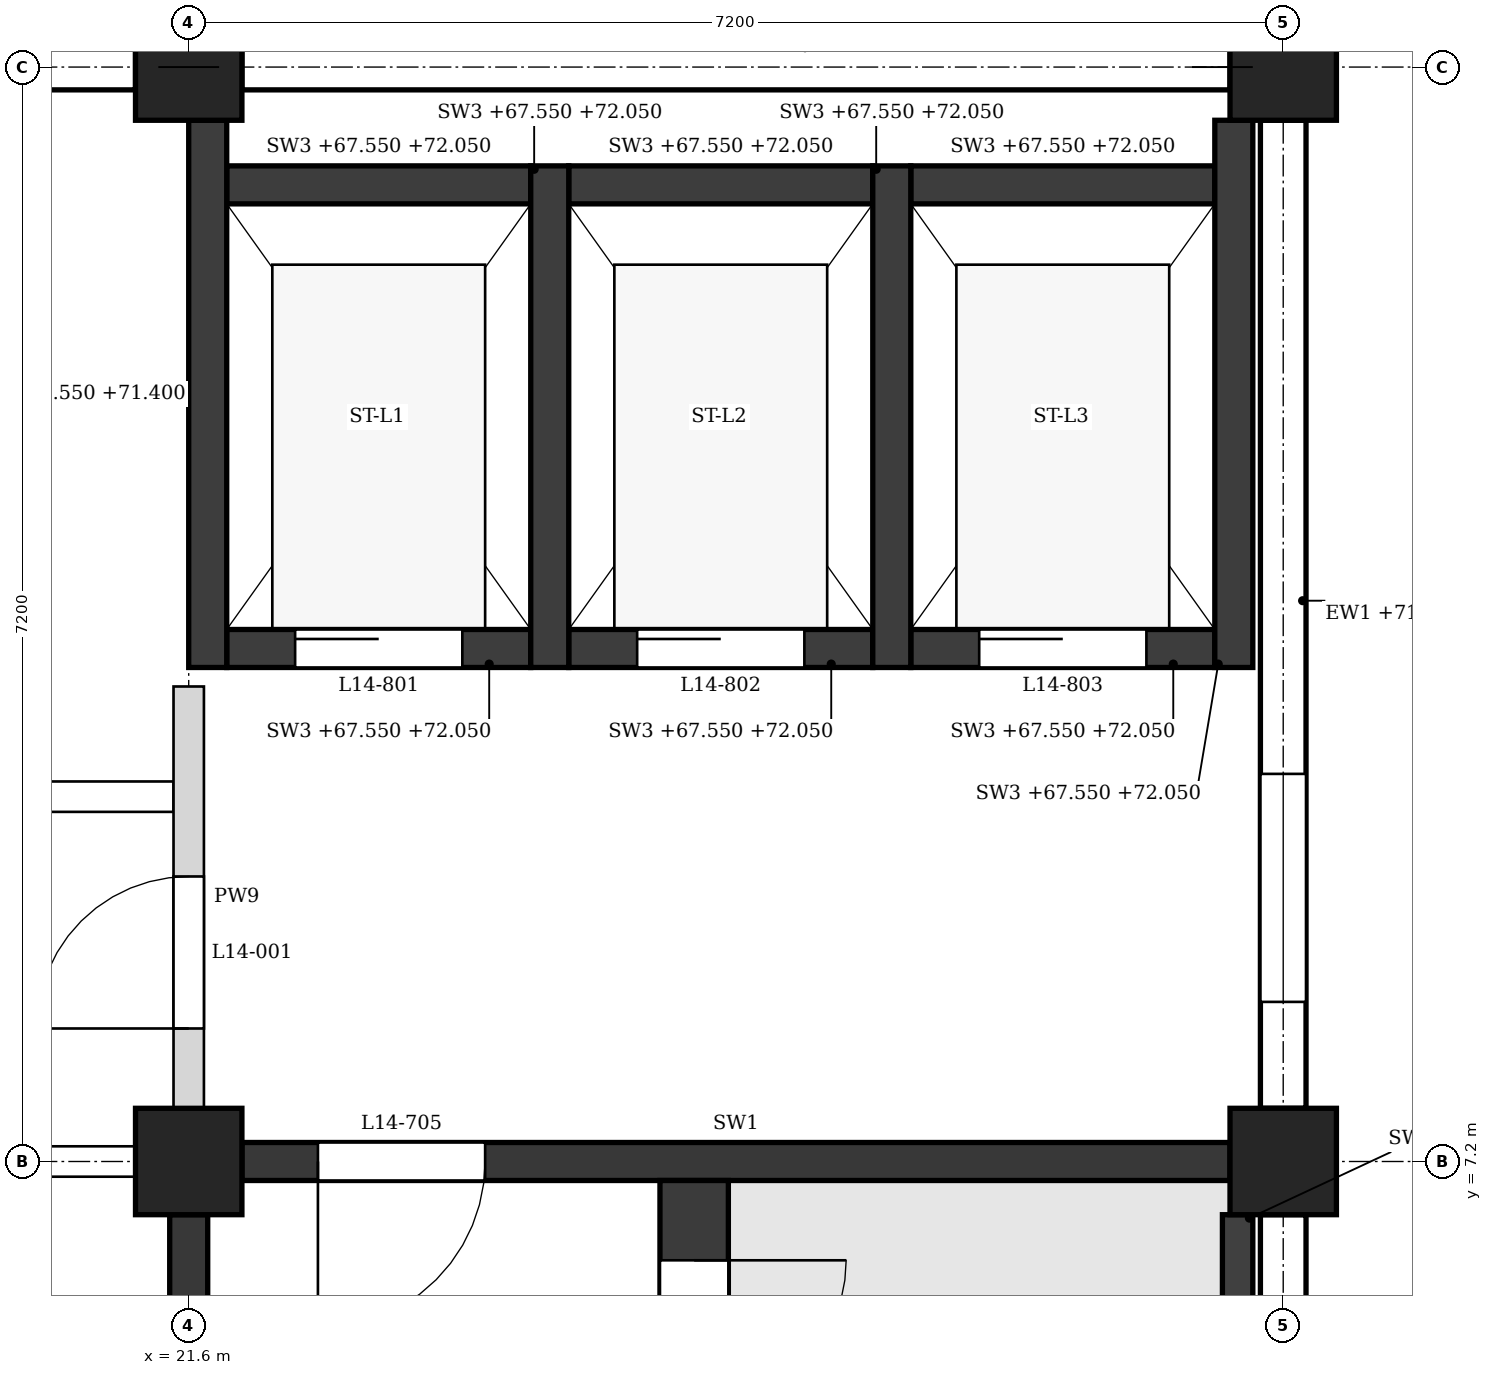
"""IFC4 building model, lengths in metres.
Left out: names, types, materials, properties, quantities, classifications, styles, units other than length and angle.
Written with IfcOpenShell. Run it as: python <this file> out.ifc"""

import sys

from ifc_helpers import new_model, si_unit, direction, frame, frame_2d, origin, origin_2d, place, context, subcontext, project, spatial, polyline, rectangle, outline, extrude, element, fill, save


model = new_model("IFC4")
c1 = context("Model", 3, precision=1e-05, world=origin(), true_north=direction((0.0, 1.0)))
c2 = subcontext(c1, "Body", "Model", "MODEL_VIEW")
j1 = project(units=[si_unit("LENGTHUNIT", "METRE"), si_unit("PLANEANGLEUNIT", "RADIAN")], contexts=[c1])
p1 = place(None, origin())
s1 = spatial("IfcSite", under=j1, at=p1, CompositionType="ELEMENT")
p2 = place(p1, origin())
s2 = spatial("IfcBuilding", under=s1, at=p2, CompositionType="ELEMENT")
p3 = place(p2, frame((0.0, 0.0, 67.8)))
s3 = spatial("IfcBuildingStorey", under=s2, at=p3, CompositionType="ELEMENT", Elevation=67.8)
for number, where, z_axis, x_axis in (
    (1, (21.6, 7.2, 0.0), (0.0, 0.0, 1.0), (1.0, 0.0, 0.0)),
    (2, (21.6, 14.4, 0.0), (0.0, 0.0, 1.0), (1.0, 0.0, 0.0)),
    (3, (28.8, 7.2, 0.0), (0.0, 0.0, 1.0), (1.0, 0.0, 0.0)),
    (4, (28.8, 14.4, 0.0), (0.0, 0.0, 1.0), (1.0, 0.0, 0.0)),
):
    element("IfcColumn", number, at=place(p3, frame(where, z_axis=z_axis, x_axis=x_axis)), inside=s3, PredefinedType="COLUMN", context=c2, shape_type="SweptSolid", body=[
        extrude(rectangle(XDim=0.7, YDim=0.7, at=origin_2d()), origin(), (0.0, 0.0, 1.0), 4.5),
    ])
p4 = place(p3, frame((28.8, 0.35, 0.0), z_axis=(0.0, 0.0, 1.0), x_axis=(0.0, 1.0, 0.0)))
e5 = element("IfcWall", 5, at=p4, inside=s3, PredefinedType="STANDARD", context=c2, shape_type="SweptSolid", body=[
    extrude(rectangle(XDim=6.5, YDim=0.3, at=frame_2d((3.25, 0.0))), origin(), (0.0, 0.0, 1.0), 3.65),
])
p5 = place(p4, frame((1.0, 0.0, 0.9)))
e6 = element("IfcOpeningElement", 6, at=p5, cuts=e5, PredefinedType="OPENING", context=c2, shape_type="SweptSolid", body=[
    extrude(outline(polyline([(0.0, 0.0), (0.9, 0.0), (0.9, 2.25), (0.45, 2.7), (0.0, 2.25), (0.0, 0.0)])), frame((0.0, 0.16, 0.0), z_axis=(0.0, -1.0, 0.0), x_axis=(1.0, 0.0, 0.0)), (0.0, 0.0, 1.0), 0.32),
])
p6 = place(p4, frame((4.6, 0.0, 0.9)))
e7 = element("IfcOpeningElement", 7, at=p6, cuts=e5, PredefinedType="OPENING", context=c2, shape_type="SweptSolid", body=[
    extrude(outline(polyline([(0.0, 0.0), (0.9, 0.0), (0.9, 2.25), (0.45, 2.7), (0.0, 2.25), (0.0, 0.0)])), frame((0.0, 0.16, 0.0), z_axis=(0.0, -1.0, 0.0), x_axis=(1.0, 0.0, 0.0)), (0.0, 0.0, 1.0), 0.32),
])
p7 = place(p3, frame((28.8, 7.55, 0.0), z_axis=(0.0, 0.0, 1.0), x_axis=(0.0, 1.0, 0.0)))
e8 = element("IfcWall", 8, at=p7, inside=s3, PredefinedType="STANDARD", context=c2, shape_type="SweptSolid", body=[
    extrude(rectangle(XDim=6.5, YDim=0.3, at=frame_2d((3.25, 0.0))), origin(), (0.0, 0.0, 1.0), 3.65),
])
p8 = place(p7, frame((0.7, 0.0, 0.9)))
e9 = element("IfcOpeningElement", 9, at=p8, cuts=e8, PredefinedType="OPENING", context=c2, shape_type="SweptSolid", body=[
    extrude(outline(polyline([(0.0, 0.0), (1.5, 0.0), (1.5, 1.95), (0.75, 2.7), (0.0, 1.95), (0.0, 0.0)])), frame((0.0, 0.16, 0.0), z_axis=(0.0, -1.0, 0.0), x_axis=(1.0, 0.0, 0.0)), (0.0, 0.0, 1.0), 0.32),
])
p9 = place(p3, frame((28.45, 14.4, 0.0), z_axis=(0.0, 0.0, 1.0), x_axis=(-1.0, 0.0, 0.0)))
e10 = element("IfcWall", 10, at=p9, inside=s3, PredefinedType="STANDARD", context=c2, shape_type="SweptSolid", body=[
    extrude(rectangle(XDim=6.5, YDim=0.3, at=frame_2d((3.25, 0.0))), origin(), (0.0, 0.0, 1.0), 3.65),
])
p10 = place(p3, frame((21.25, 14.4, 0.0), z_axis=(0.0, 0.0, 1.0), x_axis=(-1.0, 0.0, 0.0)))
e11 = element("IfcWall", 11, at=p10, inside=s3, PredefinedType="STANDARD", context=c2, shape_type="SweptSolid", body=[
    extrude(rectangle(XDim=6.5, YDim=0.3, at=frame_2d((3.25, 0.0))), origin(), (0.0, 0.0, 1.0), 3.65),
])
p11 = place(p10, frame((4.15, 0.0, 0.0)))
e12 = element("IfcOpeningElement", 12, at=p11, cuts=e11, PredefinedType="OPENING", context=c2, shape_type="SweptSolid", body=[
    extrude(rectangle(XDim=1.8, YDim=2.4, at=frame_2d((0.9, 1.2))), frame((0.0, 0.16, 0.0), z_axis=(0.0, -1.0, 0.0), x_axis=(1.0, 0.0, 0.0)), (0.0, 0.0, 1.0), 0.32),
])
p12 = place(p10, frame((0.7, 0.0, 0.9)))
e13 = element("IfcOpeningElement", 13, at=p12, cuts=e11, PredefinedType="OPENING", context=c2, shape_type="SweptSolid", body=[
    extrude(outline(polyline([(0.0, 0.0), (1.5, 0.0), (1.5, 1.95), (0.75, 2.7), (0.0, 1.95), (0.0, 0.0)])), frame((0.0, 0.16, 0.0), z_axis=(0.0, -1.0, 0.0), x_axis=(1.0, 0.0, 0.0)), (0.0, 0.0, 1.0), 0.32),
])
p13 = place(p3, frame((21.95, 7.2, 0.0), z_axis=(0.0, 0.0, 1.0), x_axis=(1.0, 0.0, 0.0)))
e14 = element("IfcWall", 14, at=p13, inside=s3, PredefinedType="SHEAR", context=c2, shape_type="SweptSolid", body=[
    extrude(rectangle(XDim=6.5, YDim=0.25, at=frame_2d((3.25, 0.0))), origin(), (0.0, 0.0, 1.0), 3.6),
])
p14 = place(p13, frame((0.5, 0.0, 0.0)))
e15 = element("IfcOpeningElement", 15, at=p14, cuts=e14, PredefinedType="OPENING", context=c2, shape_type="SweptSolid", body=[
    extrude(rectangle(XDim=1.1, YDim=2.1, at=frame_2d((0.55, 1.05))), frame((0.0, 0.135, 0.0), z_axis=(0.0, -1.0, 0.0), x_axis=(1.0, 0.0, 0.0)), (0.0, 0.0, 1.0), 0.27),
])
p15 = place(p3, frame((21.6, 0.35, 0.0), z_axis=(0.0, 0.0, 1.0), x_axis=(0.0, 1.0, 0.0)))
e16 = element("IfcWall", 16, at=p15, inside=s3, PredefinedType="SHEAR", context=c2, shape_type="SweptSolid", body=[
    extrude(rectangle(XDim=6.5, YDim=0.25, at=frame_2d((3.25, 0.0))), origin(), (0.0, 0.0, 1.0), 3.6),
])
p16 = place(p3, frame((28.5, 5.85, -0.25), z_axis=(0.0, 0.0, 1.0), x_axis=(0.0, 1.0, 0.0)))
e17 = element("IfcWall", 17, at=p16, inside=s3, PredefinedType="SHEAR", context=c2, shape_type="SweptSolid", body=[
    extrude(rectangle(XDim=1.0, YDim=0.2, at=frame_2d((0.5, 0.0))), origin(), (0.0, 0.0, 1.0), 4.5),
])
p17 = place(p3, frame((24.925, 0.15, 0.0), z_axis=(0.0, 0.0, 1.0), x_axis=(0.0, 1.0, 0.0)))
e18 = element("IfcWall", 18, at=p17, inside=s3, PredefinedType="SHEAR", context=c2, shape_type="SweptSolid", body=[
    extrude(rectangle(XDim=6.925, YDim=0.45, at=frame_2d((3.462, 0.0))), origin(), (0.0, 0.0, 1.0), 4.25),
])
p18 = place(p17, frame((5.4, 0.0, 0.0)))
e19 = element("IfcOpeningElement", 19, at=p18, cuts=e18, PredefinedType="OPENING", context=c2, shape_type="SweptSolid", body=[
    extrude(rectangle(XDim=1.0, YDim=2.1, at=frame_2d((0.5, 1.05))), frame((0.0, 0.235, 0.0), z_axis=(0.0, -1.0, 0.0), x_axis=(1.0, 0.0, 0.0)), (0.0, 0.0, 1.0), 0.47),
])
p19 = place(p3, frame((21.725, 10.45, -0.25), z_axis=(0.0, 0.0, 1.0), x_axis=(0.0, 1.0, 0.0)))
e20 = element("IfcWall", 20, at=p19, inside=s3, PredefinedType="SHEAR", context=c2, shape_type="SweptSolid", body=[
    extrude(rectangle(XDim=3.6, YDim=0.25, at=frame_2d((1.8, 0.0))), origin(), (0.0, 0.0, 1.0), 3.85),
])
for number, where, z_axis, x_axis in (
    (21, (23.975, 10.45, -0.25), (0.0, 0.0, 1.0), (0.0, 1.0, 0.0)),
    (22, (26.225, 10.45, -0.25), (0.0, 0.0, 1.0), (0.0, 1.0, 0.0)),
):
    element("IfcWall", number, at=place(p3, frame(where, z_axis=z_axis, x_axis=x_axis)), inside=s3, PredefinedType="SHEAR", context=c2, shape_type="SweptSolid", body=[
        extrude(rectangle(XDim=3.3, YDim=0.25, at=frame_2d((1.65, 0.0))), origin(), (0.0, 0.0, 1.0), 4.5),
    ])
p20 = place(p3, frame((28.475, 10.45, -0.25), z_axis=(0.0, 0.0, 1.0), x_axis=(0.0, 1.0, 0.0)))
e23 = element("IfcWall", 23, at=p20, inside=s3, PredefinedType="SHEAR", context=c2, shape_type="SweptSolid", body=[
    extrude(rectangle(XDim=3.6, YDim=0.25, at=frame_2d((1.8, 0.0))), origin(), (0.0, 0.0, 1.0), 4.5),
])
p21 = place(p3, frame((21.85, 10.575, -0.25), z_axis=(0.0, 0.0, 1.0), x_axis=(1.0, 0.0, 0.0)))
e24 = element("IfcWall", 24, at=p21, inside=s3, PredefinedType="SHEAR", context=c2, shape_type="SweptSolid", body=[
    extrude(rectangle(XDim=2.0, YDim=0.25, at=frame_2d((1.0, 0.0))), origin(), (0.0, 0.0, 1.0), 4.5),
])
p22 = place(p21, frame((0.45, 0.0, 0.25)))
e25 = element("IfcOpeningElement", 25, at=p22, cuts=e24, PredefinedType="OPENING", context=c2, shape_type="SweptSolid", body=[
    extrude(rectangle(XDim=1.1, YDim=2.1, at=frame_2d((0.55, 1.05))), frame((0.0, 0.135, 0.0), z_axis=(0.0, -1.0, 0.0), x_axis=(1.0, 0.0, 0.0)), (0.0, 0.0, 1.0), 0.27),
])
p23 = place(p3, frame((21.85, 13.625, -0.25), z_axis=(0.0, 0.0, 1.0), x_axis=(1.0, 0.0, 0.0)))
e26 = element("IfcWall", 26, at=p23, inside=s3, PredefinedType="SHEAR", context=c2, shape_type="SweptSolid", body=[
    extrude(rectangle(XDim=2.0, YDim=0.25, at=frame_2d((1.0, 0.0))), origin(), (0.0, 0.0, 1.0), 4.5),
])
p24 = place(p3, frame((24.1, 10.575, -0.25), z_axis=(0.0, 0.0, 1.0), x_axis=(1.0, 0.0, 0.0)))
e27 = element("IfcWall", 27, at=p24, inside=s3, PredefinedType="SHEAR", context=c2, shape_type="SweptSolid", body=[
    extrude(rectangle(XDim=2.0, YDim=0.25, at=frame_2d((1.0, 0.0))), origin(), (0.0, 0.0, 1.0), 4.5),
])
p25 = place(p24, frame((0.45, 0.0, 0.25)))
e28 = element("IfcOpeningElement", 28, at=p25, cuts=e27, PredefinedType="OPENING", context=c2, shape_type="SweptSolid", body=[
    extrude(rectangle(XDim=1.1, YDim=2.1, at=frame_2d((0.55, 1.05))), frame((0.0, 0.135, 0.0), z_axis=(0.0, -1.0, 0.0), x_axis=(1.0, 0.0, 0.0)), (0.0, 0.0, 1.0), 0.27),
])
p26 = place(p3, frame((24.1, 13.625, -0.25), z_axis=(0.0, 0.0, 1.0), x_axis=(1.0, 0.0, 0.0)))
e29 = element("IfcWall", 29, at=p26, inside=s3, PredefinedType="SHEAR", context=c2, shape_type="SweptSolid", body=[
    extrude(rectangle(XDim=2.0, YDim=0.25, at=frame_2d((1.0, 0.0))), origin(), (0.0, 0.0, 1.0), 4.5),
])
p27 = place(p3, frame((26.35, 10.575, -0.25), z_axis=(0.0, 0.0, 1.0), x_axis=(1.0, 0.0, 0.0)))
e30 = element("IfcWall", 30, at=p27, inside=s3, PredefinedType="SHEAR", context=c2, shape_type="SweptSolid", body=[
    extrude(rectangle(XDim=2.0, YDim=0.25, at=frame_2d((1.0, 0.0))), origin(), (0.0, 0.0, 1.0), 4.5),
])
p28 = place(p27, frame((0.45, 0.0, 0.25)))
e31 = element("IfcOpeningElement", 31, at=p28, cuts=e30, PredefinedType="OPENING", context=c2, shape_type="SweptSolid", body=[
    extrude(rectangle(XDim=1.1, YDim=2.1, at=frame_2d((0.55, 1.05))), frame((0.0, 0.135, 0.0), z_axis=(0.0, -1.0, 0.0), x_axis=(1.0, 0.0, 0.0)), (0.0, 0.0, 1.0), 0.27),
])
p29 = place(p3, frame((26.35, 13.625, -0.25), z_axis=(0.0, 0.0, 1.0), x_axis=(1.0, 0.0, 0.0)))
e32 = element("IfcWall", 32, at=p29, inside=s3, PredefinedType="SHEAR", context=c2, shape_type="SweptSolid", body=[
    extrude(rectangle(XDim=2.0, YDim=0.25, at=frame_2d((1.0, 0.0))), origin(), (0.0, 0.0, 1.0), 4.5),
])
p30 = place(p3, frame((14.75, 7.2, 0.0), z_axis=(0.0, 0.0, 1.0), x_axis=(1.0, 0.0, 0.0)))
e33 = element("IfcWall", 33, at=p30, inside=s3, PredefinedType="PARTITIONING", context=c2, shape_type="SweptSolid", body=[
    extrude(rectangle(XDim=6.5, YDim=0.2, at=frame_2d((3.25, 0.0))), origin(), (0.0, 0.0, 1.0), 3.6),
])
p31 = place(p30, frame((4.375, 0.0, 0.0)))
e34 = element("IfcOpeningElement", 34, at=p31, cuts=e33, PredefinedType="OPENING", context=c2, shape_type="SweptSolid", body=[
    extrude(rectangle(XDim=1.0, YDim=2.1, at=frame_2d((0.5, 1.05))), frame((0.0, 0.11, 0.0), z_axis=(0.0, -1.0, 0.0), x_axis=(1.0, 0.0, 0.0)), (0.0, 0.0, 1.0), 0.22),
])
p32 = place(p3, frame((3.5, 9.6, 0.0), z_axis=(0.0, 0.0, 1.0), x_axis=(1.0, 0.0, 0.0)))
e35 = element("IfcWall", 35, at=p32, inside=s3, PredefinedType="PARTITIONING", context=c2, shape_type="SweptSolid", body=[
    extrude(outline(polyline([(0.0, 0.0), (18.0, 0.0), (18.0, 3.6), (17.9, 3.6), (17.9, 4.25), (11.1, 4.25), (11.1, 3.6), (10.7, 3.6), (10.7, 4.25), (3.9, 4.25), (3.9, 3.6), (3.5, 3.6), (3.5, 4.25), (0.0, 4.25), (0.0, 0.0)])), frame((0.0, 0.1, 0.0), z_axis=(0.0, -1.0, 0.0), x_axis=(1.0, 0.0, 0.0)), (0.0, 0.0, 1.0), 0.2),
])
p33 = place(p32, frame((15.75, 0.0, 0.0)))
e36 = element("IfcOpeningElement", 36, at=p33, cuts=e35, PredefinedType="OPENING", context=c2, shape_type="SweptSolid", body=[
    extrude(rectangle(XDim=1.0, YDim=2.1, at=frame_2d((0.5, 1.05))), frame((0.0, 0.11, 0.0), z_axis=(0.0, -1.0, 0.0), x_axis=(1.0, 0.0, 0.0)), (0.0, 0.0, 1.0), 0.22),
])
p34 = place(p32, frame((1.4, 0.0, 0.0)))
e37 = element("IfcOpeningElement", 37, at=p34, cuts=e35, PredefinedType="OPENING", context=c2, shape_type="SweptSolid", body=[
    extrude(rectangle(XDim=1.0, YDim=2.1, at=frame_2d((0.5, 1.05))), frame((0.0, 0.11, 0.0), z_axis=(0.0, -1.0, 0.0), x_axis=(1.0, 0.0, 0.0)), (0.0, 0.0, 1.0), 0.22),
])
p35 = place(p32, frame((5.0, 0.0, 0.0)))
e38 = element("IfcOpeningElement", 38, at=p35, cuts=e35, PredefinedType="OPENING", context=c2, shape_type="SweptSolid", body=[
    extrude(rectangle(XDim=1.0, YDim=2.1, at=frame_2d((0.5, 1.05))), frame((0.0, 0.11, 0.0), z_axis=(0.0, -1.0, 0.0), x_axis=(1.0, 0.0, 0.0)), (0.0, 0.0, 1.0), 0.22),
])
p36 = place(p32, frame((8.6, 0.0, 0.0)))
e39 = element("IfcOpeningElement", 39, at=p36, cuts=e35, PredefinedType="OPENING", context=c2, shape_type="SweptSolid", body=[
    extrude(rectangle(XDim=1.0, YDim=2.1, at=frame_2d((0.5, 1.05))), frame((0.0, 0.11, 0.0), z_axis=(0.0, -1.0, 0.0), x_axis=(1.0, 0.0, 0.0)), (0.0, 0.0, 1.0), 0.22),
])
p37 = place(p32, frame((12.2, 0.0, 0.0)))
e40 = element("IfcOpeningElement", 40, at=p37, cuts=e35, PredefinedType="OPENING", context=c2, shape_type="SweptSolid", body=[
    extrude(rectangle(XDim=1.0, YDim=2.1, at=frame_2d((0.5, 1.05))), frame((0.0, 0.11, 0.0), z_axis=(0.0, -1.0, 0.0), x_axis=(1.0, 0.0, 0.0)), (0.0, 0.0, 1.0), 0.22),
])
p38 = place(p3, frame((21.6, 7.55, 0.0), z_axis=(0.0, 0.0, 1.0), x_axis=(0.0, 1.0, 0.0)))
e41 = element("IfcWall", 41, at=p38, inside=s3, PredefinedType="PARTITIONING", context=c2, shape_type="SweptSolid", body=[
    extrude(rectangle(XDim=2.775, YDim=0.2, at=frame_2d((1.387, 0.0))), origin(), (0.0, 0.0, 1.0), 3.6),
])
p39 = place(p38, frame((0.525, 0.0, 0.0)))
e42 = element("IfcOpeningElement", 42, at=p39, cuts=e41, PredefinedType="OPENING", context=c2, shape_type="SweptSolid", body=[
    extrude(rectangle(XDim=1.0, YDim=2.1, at=frame_2d((0.5, 1.05))), frame((0.0, 0.11, 0.0), z_axis=(0.0, -1.0, 0.0), x_axis=(1.0, 0.0, 0.0)), (0.0, 0.0, 1.0), 0.22),
])
p40 = place(p8, origin())
e43 = element("IfcWindow", 43, at=p40, inside=s3, PartitioningType="SINGLE_PANEL", PredefinedType="WINDOW", context=c2, shape_type="SweptSolid", body=[
    extrude(outline(polyline([(0.0, 0.0), (1.5, 0.0), (1.5, 1.95), (0.75, 2.7), (0.0, 1.95), (0.0, 0.0)])), frame((0.0, 0.03, 0.0), z_axis=(0.0, -1.0, 0.0), x_axis=(1.0, 0.0, 0.0)), (0.0, 0.0, 1.0), 0.06),
])
fill(e9, e43)
p41 = place(p18, frame((1.0, 0.0, 0.0), z_axis=(0.0, 0.0, 1.0), x_axis=(-1.0, 0.0, 0.0)))
e44 = element("IfcDoor", 44, at=p41, inside=s3, OperationType="SINGLE_SWING_LEFT", PredefinedType="DOOR", context=c2, shape_type="SweptSolid", body=[
    extrude(rectangle(XDim=1.0, YDim=2.1, at=frame_2d((0.5, 1.05))), frame((0.0, 0.025, 0.0), z_axis=(0.0, -1.0, 0.0), x_axis=(1.0, 0.0, 0.0)), (0.0, 0.0, 1.0), 0.05),
])
fill(e19, e44)
p42 = place(p14, frame((1.1, 0.0, 0.0), z_axis=(0.0, 0.0, 1.0), x_axis=(-1.0, 0.0, 0.0)))
e45 = element("IfcDoor", 45, at=p42, inside=s3, OperationType="SINGLE_SWING_RIGHT", PredefinedType="DOOR", context=c2, shape_type="SweptSolid", body=[
    extrude(rectangle(XDim=1.1, YDim=2.1, at=frame_2d((0.55, 1.05))), frame((0.0, 0.025, 0.0), z_axis=(0.0, -1.0, 0.0), x_axis=(1.0, 0.0, 0.0)), (0.0, 0.0, 1.0), 0.05),
])
fill(e15, e45)
p43 = place(p22, origin())
e46 = element("IfcDoor", 46, at=p43, inside=s3, OperationType="SLIDING_TO_LEFT", PredefinedType="DOOR", context=c2, shape_type="SweptSolid", body=[
    extrude(rectangle(XDim=1.1, YDim=2.1, at=frame_2d((0.55, 1.05))), frame((0.0, 0.025, 0.0), z_axis=(0.0, -1.0, 0.0), x_axis=(1.0, 0.0, 0.0)), (0.0, 0.0, 1.0), 0.05),
])
fill(e25, e46)
p44 = place(p25, origin())
e47 = element("IfcDoor", 47, at=p44, inside=s3, OperationType="SLIDING_TO_LEFT", PredefinedType="DOOR", context=c2, shape_type="SweptSolid", body=[
    extrude(rectangle(XDim=1.1, YDim=2.1, at=frame_2d((0.55, 1.05))), frame((0.0, 0.025, 0.0), z_axis=(0.0, -1.0, 0.0), x_axis=(1.0, 0.0, 0.0)), (0.0, 0.0, 1.0), 0.05),
])
fill(e28, e47)
p45 = place(p28, origin())
e48 = element("IfcDoor", 48, at=p45, inside=s3, OperationType="SLIDING_TO_LEFT", PredefinedType="DOOR", context=c2, shape_type="SweptSolid", body=[
    extrude(rectangle(XDim=1.1, YDim=2.1, at=frame_2d((0.55, 1.05))), frame((0.0, 0.025, 0.0), z_axis=(0.0, -1.0, 0.0), x_axis=(1.0, 0.0, 0.0)), (0.0, 0.0, 1.0), 0.05),
])
fill(e31, e48)
p46 = place(p39, origin())
e49 = element("IfcDoor", 49, at=p46, inside=s3, OperationType="SINGLE_SWING_LEFT", PredefinedType="DOOR", context=c2, shape_type="SweptSolid", body=[
    extrude(rectangle(XDim=1.0, YDim=2.1, at=frame_2d((0.5, 1.05))), frame((0.0, 0.025, 0.0), z_axis=(0.0, -1.0, 0.0), x_axis=(1.0, 0.0, 0.0)), (0.0, 0.0, 1.0), 0.05),
])
fill(e42, e49)
save(model, sys.argv[1])
